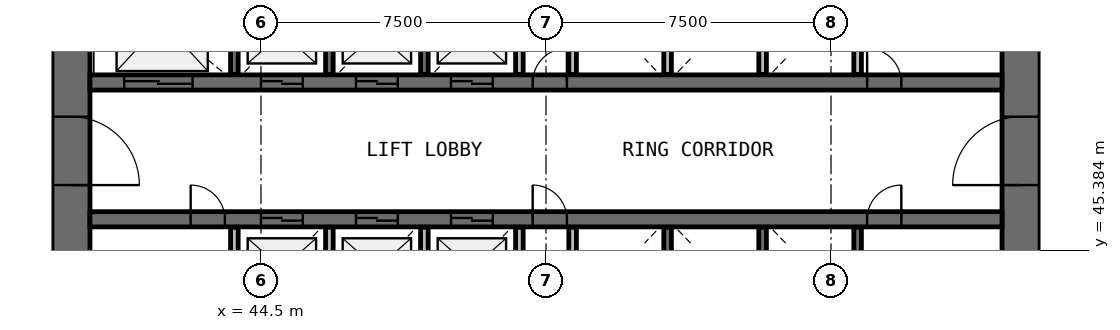
"""IFC4 building model, lengths in metres.
Left out: names, types, materials, properties, quantities, classifications, styles, units other than length and angle.
Written with IfcOpenShell. Run it as: python <this file> out.ifc"""

import sys

from ifc_helpers import new_model, si_unit, direction, frame, frame_2d, origin, place, context, subcontext, project, spatial, rectangle, extrude, source, transform, mapped, element, fill, save


model = new_model("IFC4")
c1 = context("Model", 3, precision=1e-05, world=origin(), true_north=direction((0.0, 1.0)))
c2 = subcontext(c1, "Body", "Model", "MODEL_VIEW")
j1 = project(units=[si_unit("LENGTHUNIT", "METRE"), si_unit("PLANEANGLEUNIT", "RADIAN")], contexts=[c1])
p1 = place(None, origin())
s1 = spatial("IfcSite", under=j1, at=p1, CompositionType="ELEMENT")
p2 = place(p1, origin())
s2 = spatial("IfcBuilding", under=s1, at=p2, CompositionType="ELEMENT")
p3 = place(p2, frame((0.0, 0.0, 18.2)))
s3 = spatial("IfcBuildingStorey", under=s2, at=p3, CompositionType="ELEMENT", Elevation=18.2)
p4 = place(p3, frame((64.5, 38.0, 0.0), z_axis=(0.0, 0.0, 1.0), x_axis=(0.0, 1.0, 0.0)))
e1 = element("IfcWall", 1, at=p4, inside=s3, PredefinedType="SHEAR", context=c2, shape_type="SweptSolid", body=[
    extrude(rectangle(XDim=20.0, YDim=1.0, at=frame_2d((10.0, 0.0))), origin(), (0.0, 0.0, 1.0), 4.4),
])
p5 = place(p4, frame((9.1, 0.0, 0.0)))
e2 = element("IfcOpeningElement", 2, at=p5, cuts=e1, PredefinedType="OPENING", context=c2, shape_type="SweptSolid", body=[
    extrude(rectangle(XDim=1.8, YDim=2.1, at=frame_2d((0.9, 1.05))), frame((0.0, 0.51, 0.0), z_axis=(0.0, -1.0, 0.0), x_axis=(1.0, 0.0, 0.0)), (0.0, 0.0, 1.0), 1.02),
])
p6 = place(p3, frame((39.5, 58.0, 0.0), z_axis=(0.0, 0.0, 1.0), x_axis=(0.0, -1.0, 0.0)))
e3 = element("IfcWall", 3, at=p6, inside=s3, PredefinedType="SHEAR", context=c2, shape_type="SweptSolid", body=[
    extrude(rectangle(XDim=20.0, YDim=1.0, at=frame_2d((10.0, 0.0))), origin(), (0.0, 0.0, 1.0), 4.4),
])
p7 = place(p6, frame((9.1, 0.0, 0.0)))
e4 = element("IfcOpeningElement", 4, at=p7, cuts=e3, PredefinedType="OPENING", context=c2, shape_type="SweptSolid", body=[
    extrude(rectangle(XDim=1.8, YDim=2.1, at=frame_2d((0.9, 1.05))), frame((0.0, 0.51, 0.0), z_axis=(0.0, -1.0, 0.0), x_axis=(1.0, 0.0, 0.0)), (0.0, 0.0, 1.0), 1.02),
])
p8 = place(p3, frame((40.0, 49.8, 0.0), z_axis=(0.0, 0.0, 1.0), x_axis=(1.0, 0.0, 0.0)))
e5 = element("IfcWall", 5, at=p8, inside=s3, PredefinedType="SHEAR", context=c2, shape_type="SweptSolid", body=[
    extrude(rectangle(XDim=24.0, YDim=0.4, at=frame_2d((12.0, 0.0))), origin(), (0.0, 0.0, 1.0), 4.4),
])
p9 = place(p8, frame((4.5, 0.0, 0.0)))
e6 = element("IfcOpeningElement", 6, at=p9, cuts=e5, PredefinedType="OPENING", context=c2, shape_type="SweptSolid", body=[
    extrude(rectangle(XDim=1.1, YDim=2.1, at=frame_2d((0.55, 1.05))), frame((0.0, 0.21, 0.0), z_axis=(0.0, -1.0, 0.0), x_axis=(1.0, 0.0, 0.0)), (0.0, 0.0, 1.0), 0.42),
])
p10 = place(p8, frame((7.0, 0.0, 0.0)))
e7 = element("IfcOpeningElement", 7, at=p10, cuts=e5, PredefinedType="OPENING", context=c2, shape_type="SweptSolid", body=[
    extrude(rectangle(XDim=1.1, YDim=2.1, at=frame_2d((0.55, 1.05))), frame((0.0, 0.21, 0.0), z_axis=(0.0, -1.0, 0.0), x_axis=(1.0, 0.0, 0.0)), (0.0, 0.0, 1.0), 0.42),
])
p11 = place(p8, frame((9.5, 0.0, 0.0)))
e8 = element("IfcOpeningElement", 8, at=p11, cuts=e5, PredefinedType="OPENING", context=c2, shape_type="SweptSolid", body=[
    extrude(rectangle(XDim=1.1, YDim=2.1, at=frame_2d((0.55, 1.05))), frame((0.0, 0.21, 0.0), z_axis=(0.0, -1.0, 0.0), x_axis=(1.0, 0.0, 0.0)), (0.0, 0.0, 1.0), 0.42),
])
p12 = place(p8, frame((0.9, 0.0, 0.0)))
e9 = element("IfcOpeningElement", 9, at=p12, cuts=e5, PredefinedType="OPENING", context=c2, shape_type="SweptSolid", body=[
    extrude(rectangle(XDim=1.8, YDim=2.4, at=frame_2d((0.9, 1.2))), frame((0.0, 0.21, 0.0), z_axis=(0.0, -1.0, 0.0), x_axis=(1.0, 0.0, 0.0)), (0.0, 0.0, 1.0), 0.42),
])
p13 = place(p8, frame((20.45, 0.0, 0.0)))
e10 = element("IfcOpeningElement", 10, at=p13, cuts=e5, PredefinedType="OPENING", context=c2, shape_type="SweptSolid", body=[
    extrude(rectangle(XDim=0.9, YDim=2.1, at=frame_2d((0.45, 1.05))), frame((0.0, 0.21, 0.0), z_axis=(0.0, -1.0, 0.0), x_axis=(1.0, 0.0, 0.0)), (0.0, 0.0, 1.0), 0.42),
])
p14 = place(p8, frame((11.65, 0.0, 0.0)))
e11 = element("IfcOpeningElement", 11, at=p14, cuts=e5, PredefinedType="OPENING", context=c2, shape_type="SweptSolid", body=[
    extrude(rectangle(XDim=0.9, YDim=2.1, at=frame_2d((0.45, 1.05))), frame((0.0, 0.21, 0.0), z_axis=(0.0, -1.0, 0.0), x_axis=(1.0, 0.0, 0.0)), (0.0, 0.0, 1.0), 0.42),
])
p15 = place(p3, frame((40.0, 46.2, 0.0), z_axis=(0.0, 0.0, 1.0), x_axis=(1.0, 0.0, 0.0)))
e12 = element("IfcWall", 12, at=p15, inside=s3, PredefinedType="SHEAR", context=c2, shape_type="SweptSolid", body=[
    extrude(rectangle(XDim=24.0, YDim=0.4, at=frame_2d((12.0, 0.0))), origin(), (0.0, 0.0, 1.0), 4.4),
])
p16 = place(p15, frame((4.5, 0.0, 0.0)))
e13 = element("IfcOpeningElement", 13, at=p16, cuts=e12, PredefinedType="OPENING", context=c2, shape_type="SweptSolid", body=[
    extrude(rectangle(XDim=1.1, YDim=2.1, at=frame_2d((0.55, 1.05))), frame((0.0, 0.21, 0.0), z_axis=(0.0, -1.0, 0.0), x_axis=(1.0, 0.0, 0.0)), (0.0, 0.0, 1.0), 0.42),
])
p17 = place(p15, frame((7.0, 0.0, 0.0)))
e14 = element("IfcOpeningElement", 14, at=p17, cuts=e12, PredefinedType="OPENING", context=c2, shape_type="SweptSolid", body=[
    extrude(rectangle(XDim=1.1, YDim=2.1, at=frame_2d((0.55, 1.05))), frame((0.0, 0.21, 0.0), z_axis=(0.0, -1.0, 0.0), x_axis=(1.0, 0.0, 0.0)), (0.0, 0.0, 1.0), 0.42),
])
p18 = place(p15, frame((9.5, 0.0, 0.0)))
e15 = element("IfcOpeningElement", 15, at=p18, cuts=e12, PredefinedType="OPENING", context=c2, shape_type="SweptSolid", body=[
    extrude(rectangle(XDim=1.1, YDim=2.1, at=frame_2d((0.55, 1.05))), frame((0.0, 0.21, 0.0), z_axis=(0.0, -1.0, 0.0), x_axis=(1.0, 0.0, 0.0)), (0.0, 0.0, 1.0), 0.42),
])
p19 = place(p15, frame((20.45, 0.0, 0.0)))
e16 = element("IfcOpeningElement", 16, at=p19, cuts=e12, PredefinedType="OPENING", context=c2, shape_type="SweptSolid", body=[
    extrude(rectangle(XDim=0.9, YDim=2.1, at=frame_2d((0.45, 1.05))), frame((0.0, 0.21, 0.0), z_axis=(0.0, -1.0, 0.0), x_axis=(1.0, 0.0, 0.0)), (0.0, 0.0, 1.0), 0.42),
])
p20 = place(p15, frame((2.65, 0.0, 0.0)))
e17 = element("IfcOpeningElement", 17, at=p20, cuts=e12, PredefinedType="OPENING", context=c2, shape_type="SweptSolid", body=[
    extrude(rectangle(XDim=0.9, YDim=2.1, at=frame_2d((0.45, 1.05))), frame((0.0, 0.21, 0.0), z_axis=(0.0, -1.0, 0.0), x_axis=(1.0, 0.0, 0.0)), (0.0, 0.0, 1.0), 0.42),
])
p21 = place(p15, frame((11.65, 0.0, 0.0)))
e18 = element("IfcOpeningElement", 18, at=p21, cuts=e12, PredefinedType="OPENING", context=c2, shape_type="SweptSolid", body=[
    extrude(rectangle(XDim=0.9, YDim=2.1, at=frame_2d((0.45, 1.05))), frame((0.0, 0.21, 0.0), z_axis=(0.0, -1.0, 0.0), x_axis=(1.0, 0.0, 0.0)), (0.0, 0.0, 1.0), 0.42),
])
for number, where, z_axis, x_axis in (
    (19, (43.8, 45.99, 0.0), (0.0, 0.0, 1.0), (0.0, -1.0, 0.0)),
    (20, (43.8, 52.37, 0.0), (0.0, 0.0, 1.0), (0.0, -1.0, 0.0)),
):
    element("IfcWall", number, at=place(p3, frame(where, z_axis=z_axis, x_axis=x_axis)), inside=s3, PredefinedType="SOLIDWALL", context=c2, shape_type="SweptSolid", body=[
        extrude(rectangle(XDim=2.36, YDim=0.2, at=frame_2d((1.18, 0.0))), origin(), (0.0, 0.0, 1.0), 3.95),
    ])
p22 = place(p3, frame((46.3, 43.6, 0.0), z_axis=(0.0, 0.0, 1.0), x_axis=(0.0, 1.0, 0.0)))
e21 = element("IfcWall", 21, at=p22, inside=s3, PredefinedType="SOLIDWALL", context=c2, shape_type="SweptSolid", body=[
    extrude(rectangle(XDim=2.39, YDim=0.2, at=frame_2d((1.195, 0.0))), origin(), (0.0, 0.0, 1.0), 3.95),
])
for number, where, z_axis, x_axis in (
    (22, (46.3, 50.01, 0.0), (0.0, 0.0, 1.0), (0.0, 1.0, 0.0)),
    (23, (48.8, 43.63, 0.0), (0.0, 0.0, 1.0), (0.0, 1.0, 0.0)),
    (24, (48.8, 50.01, 0.0), (0.0, 0.0, 1.0), (0.0, 1.0, 0.0)),
    (25, (51.3, 43.63, 0.0), (0.0, 0.0, 1.0), (0.0, 1.0, 0.0)),
):
    element("IfcWall", number, at=place(p3, frame(where, z_axis=z_axis, x_axis=x_axis)), inside=s3, PredefinedType="SOLIDWALL", context=c2, shape_type="SweptSolid", body=[
        extrude(rectangle(XDim=2.36, YDim=0.2, at=frame_2d((1.18, 0.0))), origin(), (0.0, 0.0, 1.0), 3.95),
    ])
for number, where, z_axis, x_axis in (
    (26, (51.3, 50.01, 0.0), (0.0, 0.0, 1.0), (0.0, 1.0, 0.0)),
    (27, (52.7, 45.99, 0.0), (0.0, 0.0, 1.0), (0.0, -1.0, 0.0)),
):
    element("IfcWall", number, at=place(p3, frame(where, z_axis=z_axis, x_axis=x_axis)), inside=s3, PredefinedType="SOLIDWALL", context=c2, shape_type="SweptSolid", body=[
        extrude(rectangle(XDim=2.39, YDim=0.2, at=frame_2d((1.195, 0.0))), origin(), (0.0, 0.0, 1.0), 3.95),
    ])
for number, where, z_axis, x_axis in (
    (28, (52.7, 52.37, 0.0), (0.0, 0.0, 1.0), (0.0, -1.0, 0.0)),
    (29, (55.2, 43.63, 0.0), (0.0, 0.0, 1.0), (0.0, 1.0, 0.0)),
    (30, (55.2, 50.01, 0.0), (0.0, 0.0, 1.0), (0.0, 1.0, 0.0)),
    (31, (57.7, 43.63, 0.0), (0.0, 0.0, 1.0), (0.0, 1.0, 0.0)),
):
    element("IfcWall", number, at=place(p3, frame(where, z_axis=z_axis, x_axis=x_axis)), inside=s3, PredefinedType="SOLIDWALL", context=c2, shape_type="SweptSolid", body=[
        extrude(rectangle(XDim=2.36, YDim=0.2, at=frame_2d((1.18, 0.0))), origin(), (0.0, 0.0, 1.0), 3.95),
    ])
p23 = place(p3, frame((57.7, 50.01, 0.0), z_axis=(0.0, 0.0, 1.0), x_axis=(0.0, 1.0, 0.0)))
e32 = element("IfcWall", 32, at=p23, inside=s3, PredefinedType="SOLIDWALL", context=c2, shape_type="SweptSolid", body=[
    extrude(rectangle(XDim=2.39, YDim=0.2, at=frame_2d((1.195, 0.0))), origin(), (0.0, 0.0, 1.0), 3.95),
])
for number, where, z_axis, x_axis in (
    (33, (60.2, 43.63, 0.0), (0.0, 0.0, 1.0), (0.0, 1.0, 0.0)),
    (34, (60.2, 50.01, 0.0), (0.0, 0.0, 1.0), (0.0, 1.0, 0.0)),
):
    element("IfcWall", number, at=place(p3, frame(where, z_axis=z_axis, x_axis=x_axis)), inside=s3, PredefinedType="SOLIDWALL", context=c2, shape_type="SweptSolid", body=[
        extrude(rectangle(XDim=2.36, YDim=0.2, at=frame_2d((1.18, 0.0))), origin(), (0.0, 0.0, 1.0), 3.95),
    ])
m1 = source(origin(), c2, "Body", "SweptSolid", [
    extrude(rectangle(XDim=1.8, YDim=2.1, at=frame_2d((0.9, 1.05))), frame((0.0, 0.025, 0.0), z_axis=(0.0, -1.0, 0.0), x_axis=(1.0, 0.0, 0.0)), (0.0, 0.0, 1.0), 0.05),
])
p24 = place(p7, origin())
e35 = element("IfcDoor", 35, at=p24, inside=s3, OperationType="SINGLE_SWING_RIGHT", PredefinedType="DOOR", context=c2, shape_type="MappedRepresentation", body=[
    mapped(m1, transform((0.0, 0.0, 0.0), scale=1.0)),
])
fill(e4, e35)
p25 = place(p5, origin())
e36 = element("IfcDoor", 36, at=p25, inside=s3, OperationType="SINGLE_SWING_LEFT", PredefinedType="DOOR", context=c2, shape_type="MappedRepresentation", body=[
    mapped(m1, transform((0.0, 0.0, 0.0), scale=1.0)),
])
fill(e2, e36)
m2 = source(origin(), c2, "Body", "SweptSolid", [
    extrude(rectangle(XDim=1.1, YDim=2.1, at=frame_2d((0.55, 1.05))), frame((0.0, 0.025, 0.0), z_axis=(0.0, -1.0, 0.0), x_axis=(1.0, 0.0, 0.0)), (0.0, 0.0, 1.0), 0.05),
])
p26 = place(p9, origin())
e37 = element("IfcDoor", 37, at=p26, inside=s3, OperationType="DOUBLE_DOOR_SLIDING", PredefinedType="USERDEFINED", context=c2, shape_type="MappedRepresentation", body=[
    mapped(m2, transform((0.0, 0.0, 0.0), scale=1.0)),
])
fill(e6, e37)
p27 = place(p10, origin())
e38 = element("IfcDoor", 38, at=p27, inside=s3, OperationType="DOUBLE_DOOR_SLIDING", PredefinedType="USERDEFINED", context=c2, shape_type="MappedRepresentation", body=[
    mapped(m2, transform((0.0, 0.0, 0.0), scale=1.0)),
])
fill(e7, e38)
p28 = place(p11, origin())
e39 = element("IfcDoor", 39, at=p28, inside=s3, OperationType="DOUBLE_DOOR_SLIDING", PredefinedType="USERDEFINED", context=c2, shape_type="MappedRepresentation", body=[
    mapped(m2, transform((0.0, 0.0, 0.0), scale=1.0)),
])
fill(e8, e39)
p29 = place(p16, origin())
e40 = element("IfcDoor", 40, at=p29, inside=s3, OperationType="DOUBLE_DOOR_SLIDING", PredefinedType="USERDEFINED", context=c2, shape_type="MappedRepresentation", body=[
    mapped(m2, transform((0.0, 0.0, 0.0), scale=1.0)),
])
fill(e13, e40)
p30 = place(p17, origin())
e41 = element("IfcDoor", 41, at=p30, inside=s3, OperationType="DOUBLE_DOOR_SLIDING", PredefinedType="USERDEFINED", context=c2, shape_type="MappedRepresentation", body=[
    mapped(m2, transform((0.0, 0.0, 0.0), scale=1.0)),
])
fill(e14, e41)
p31 = place(p18, origin())
e42 = element("IfcDoor", 42, at=p31, inside=s3, OperationType="DOUBLE_DOOR_SLIDING", PredefinedType="USERDEFINED", context=c2, shape_type="MappedRepresentation", body=[
    mapped(m2, transform((0.0, 0.0, 0.0), scale=1.0)),
])
fill(e15, e42)
m3 = source(origin(), c2, "Body", "SweptSolid", [
    extrude(rectangle(XDim=1.8, YDim=2.4, at=frame_2d((0.9, 1.2))), frame((0.0, 0.025, 0.0), z_axis=(0.0, -1.0, 0.0), x_axis=(1.0, 0.0, 0.0)), (0.0, 0.0, 1.0), 0.05),
])
p32 = place(p12, origin())
e43 = element("IfcDoor", 43, at=p32, inside=s3, OperationType="DOUBLE_DOOR_SLIDING", PredefinedType="USERDEFINED", context=c2, shape_type="MappedRepresentation", body=[
    mapped(m3, transform((0.0, 0.0, 0.0), scale=1.0)),
])
fill(e9, e43)
m4 = source(origin(), c2, "Body", "SweptSolid", [
    extrude(rectangle(XDim=0.9, YDim=2.1, at=frame_2d((0.45, 1.05))), frame((0.0, 0.025, 0.0), z_axis=(0.0, -1.0, 0.0), x_axis=(1.0, 0.0, 0.0)), (0.0, 0.0, 1.0), 0.05),
])
p33 = place(p19, origin())
e44 = element("IfcDoor", 44, at=p33, inside=s3, OperationType="SINGLE_SWING_RIGHT", PredefinedType="DOOR", context=c2, shape_type="MappedRepresentation", body=[
    mapped(m4, transform((0.0, 0.0, 0.0), scale=1.0)),
])
fill(e16, e44)
p34 = place(p13, origin())
e45 = element("IfcDoor", 45, at=p34, inside=s3, OperationType="SINGLE_SWING_LEFT", PredefinedType="DOOR", context=c2, shape_type="MappedRepresentation", body=[
    mapped(m4, transform((0.0, 0.0, 0.0), scale=1.0)),
])
fill(e10, e45)
p35 = place(p20, origin())
e46 = element("IfcDoor", 46, at=p35, inside=s3, OperationType="SINGLE_SWING_LEFT", PredefinedType="DOOR", context=c2, shape_type="MappedRepresentation", body=[
    mapped(m4, transform((0.0, 0.0, 0.0), scale=1.0)),
])
fill(e17, e46)
p36 = place(p14, origin())
e47 = element("IfcDoor", 47, at=p36, inside=s3, OperationType="SINGLE_SWING_RIGHT", PredefinedType="DOOR", context=c2, shape_type="MappedRepresentation", body=[
    mapped(m4, transform((0.0, 0.0, 0.0), scale=1.0)),
])
fill(e11, e47)
p37 = place(p21, origin())
e48 = element("IfcDoor", 48, at=p37, inside=s3, OperationType="SINGLE_SWING_LEFT", PredefinedType="DOOR", context=c2, shape_type="MappedRepresentation", body=[
    mapped(m4, transform((0.0, 0.0, 0.0), scale=1.0)),
])
fill(e18, e48)
save(model, sys.argv[1])
